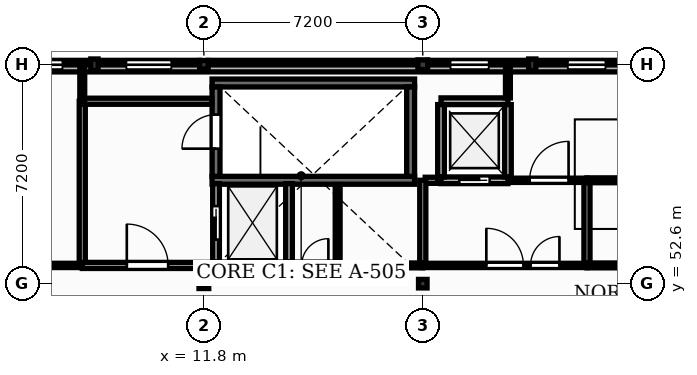
"""IFC4 building model, lengths in metres.
Left out: names, types, materials, properties, quantities, classifications, styles, units other than length and angle.
Written with IfcOpenShell. Run it as: python <this file> out.ifc"""

import sys

from ifc_helpers import new_model, si_unit, direction, frame, frame_2d, origin, origin_2d, place, context, subcontext, project, spatial, polyline, rectangle, outline, extrude, element, fill, save


model = new_model("IFC4")
c1 = context("Model", 3, precision=1e-05, world=origin(), true_north=direction((0.0, 1.0)))
c2 = subcontext(c1, "Body", "Model", "MODEL_VIEW")
j1 = project(units=[si_unit("LENGTHUNIT", "METRE"), si_unit("PLANEANGLEUNIT", "RADIAN")], contexts=[c1])
p1 = place(None, origin())
s1 = spatial("IfcSite", under=j1, at=p1, CompositionType="ELEMENT")
p2 = place(p1, origin())
s2 = spatial("IfcBuilding", under=s1, at=p2, CompositionType="ELEMENT")
p3 = place(p2, frame((0.0, 0.0, 17.4)))
s3 = spatial("IfcBuildingStorey", under=s2, at=p3, CompositionType="ELEMENT", Elevation=17.4)
p4 = place(p3, frame((11.8, 52.6, 0.0), z_axis=(0.0, 0.0, 1.0), x_axis=(1.0, 0.0, 0.0)))
e1 = element("IfcColumn", 1, at=p4, inside=s3, PredefinedType="COLUMN", context=c2, shape_type="SweptSolid", body=[
    extrude(rectangle(XDim=0.32, YDim=0.32, at=origin_2d()), origin(), (0.0, 0.0, 1.0), 3.95),
])
for number, where, z_axis, x_axis in (
    (2, (11.8, 59.8, 0.0), (0.0, 0.0, 1.0), (1.0, 0.0, 0.0)),
    (3, (19.0, 52.6, 0.0), (0.0, 0.0, 1.0), (1.0, 0.0, 0.0)),
):
    element("IfcColumn", number, at=place(p3, frame(where, z_axis=z_axis, x_axis=x_axis)), inside=s3, PredefinedType="COLUMN", context=c2, shape_type="SweptSolid", body=[
        extrude(rectangle(XDim=0.28, YDim=0.28, at=origin_2d()), origin(), (0.0, 0.0, 1.0), 3.95),
    ])
p5 = place(p3, frame((19.0, 59.8, 0.0), z_axis=(0.0, 0.0, 1.0), x_axis=(1.0, 0.0, 0.0)))
e4 = element("IfcColumn", 4, at=p5, inside=s3, PredefinedType="COLUMN", context=c2, shape_type="SweptSolid", body=[
    extrude(rectangle(XDim=0.32, YDim=0.32, at=origin_2d()), origin(), (0.0, 0.0, 1.0), 3.95),
])
for number, where, z_axis, x_axis in (
    (5, (8.2, 59.8, 0.0), (0.0, 0.0, 1.0), (1.0, 0.0, 0.0)),
    (6, (22.6, 59.8, 0.0), (0.0, 0.0, 1.0), (1.0, 0.0, 0.0)),
):
    element("IfcColumn", number, at=place(p3, frame(where, z_axis=z_axis, x_axis=x_axis)), inside=s3, PredefinedType="PILASTER", context=c2, shape_type="SweptSolid", body=[
        extrude(rectangle(XDim=0.24, YDim=0.38, at=origin_2d()), origin(), (0.0, 0.0, 1.0), 3.95),
    ])
p6 = place(p3, frame((4.76, 59.8, 0.0), z_axis=(0.0, 0.0, 1.0), x_axis=(1.0, 0.0, 0.0)))
e7 = element("IfcWall", 7, at=p6, inside=s3, PredefinedType="SOLIDWALL", context=c2, shape_type="SweptSolid", body=[
    extrude(rectangle(XDim=3.32, YDim=0.29, at=frame_2d((1.66, 0.0))), origin(), (0.0, 0.0, 1.0), 3.49),
])
p7 = place(p6, frame((0.77, 0.0, 1.0)))
e8 = element("IfcOpeningElement", 8, at=p7, cuts=e7, PredefinedType="OPENING", context=c2, shape_type="SweptSolid", body=[
    extrude(rectangle(XDim=1.62, YDim=1.95, at=frame_2d((0.81, 0.975))), frame((0.0, 0.155, 0.0), z_axis=(0.0, -1.0, 0.0), x_axis=(1.0, 0.0, 0.0)), (0.0, 0.0, 1.0), 0.31),
])
p8 = place(p3, frame((8.32, 59.8, 0.0), z_axis=(0.0, 0.0, 1.0), x_axis=(1.0, 0.0, 0.0)))
e9 = element("IfcWall", 9, at=p8, inside=s3, PredefinedType="SOLIDWALL", context=c2, shape_type="SweptSolid", body=[
    extrude(rectangle(XDim=3.34, YDim=0.29, at=frame_2d((1.67, 0.0))), origin(), (0.0, 0.0, 1.0), 3.49),
])
p9 = place(p8, frame((0.93, 0.0, 1.0)))
e10 = element("IfcOpeningElement", 10, at=p9, cuts=e9, PredefinedType="OPENING", context=c2, shape_type="SweptSolid", body=[
    extrude(rectangle(XDim=1.48, YDim=1.95, at=frame_2d((0.74, 0.975))), frame((0.0, 0.155, 0.0), z_axis=(0.0, -1.0, 0.0), x_axis=(1.0, 0.0, 0.0)), (0.0, 0.0, 1.0), 0.31),
])
p10 = place(p3, frame((11.94, 59.8, 0.0), z_axis=(0.0, 0.0, 1.0), x_axis=(1.0, 0.0, 0.0)))
e11 = element("IfcWall", 11, at=p10, inside=s3, PredefinedType="SOLIDWALL", context=c2, shape_type="SweptSolid", body=[
    extrude(rectangle(XDim=6.9, YDim=0.29, at=frame_2d((3.45, 0.0))), origin(), (0.0, 0.0, 1.0), 3.49),
])
p11 = place(p3, frame((19.16, 59.8, 0.0), z_axis=(0.0, 0.0, 1.0), x_axis=(1.0, 0.0, 0.0)))
e12 = element("IfcWall", 12, at=p11, inside=s3, PredefinedType="SOLIDWALL", context=c2, shape_type="SweptSolid", body=[
    extrude(rectangle(XDim=3.32, YDim=0.29, at=frame_2d((1.66, 0.0))), origin(), (0.0, 0.0, 1.0), 3.49),
])
p12 = place(p11, frame((0.75, 0.0, 1.05)))
e13 = element("IfcOpeningElement", 13, at=p12, cuts=e12, PredefinedType="OPENING", context=c2, shape_type="SweptSolid", body=[
    extrude(rectangle(XDim=1.26, YDim=1.65, at=frame_2d((0.63, 0.825))), frame((0.0, 0.155, 0.0), z_axis=(0.0, -1.0, 0.0), x_axis=(1.0, 0.0, 0.0)), (0.0, 0.0, 1.0), 0.31),
])
p13 = place(p3, frame((22.72, 59.8, 0.0), z_axis=(0.0, 0.0, 1.0), x_axis=(1.0, 0.0, 0.0)))
e14 = element("IfcWall", 14, at=p13, inside=s3, PredefinedType="SOLIDWALL", context=c2, shape_type="SweptSolid", body=[
    extrude(rectangle(XDim=3.34, YDim=0.29, at=frame_2d((1.67, 0.0))), origin(), (0.0, 0.0, 1.0), 3.49),
])
p14 = place(p13, frame((1.05, 0.0, 1.0)))
e15 = element("IfcOpeningElement", 15, at=p14, cuts=e14, PredefinedType="OPENING", context=c2, shape_type="SweptSolid", body=[
    extrude(rectangle(XDim=1.24, YDim=1.8, at=frame_2d((0.62, 0.9))), frame((0.0, 0.155, 0.0), z_axis=(0.0, -1.0, 0.0), x_axis=(1.0, 0.0, 0.0)), (0.0, 0.0, 1.0), 0.31),
])
p15 = place(p3, frame((4.6, 59.68, 4.2), z_axis=(0.0, 0.0, 1.0), x_axis=(1.0, 0.0, 0.0)))
e16 = element("IfcWall", 16, at=p15, inside=s3, PredefinedType="PARAPET", context=c2, shape_type="SweptSolid", body=[
    extrude(outline(polyline([(0.0, 0.0), (50.4, 0.0), (50.4, 0.65), (39.312, 0.925), (39.312, 0.65), (32.256, 1.2), (32.256, 0.925), (18.144, 1.2), (18.144, 0.925), (11.088, 0.925), (11.088, 0.65), (0.0, 0.65), (0.0, 0.0)])), frame((0.0, 0.115, 0.0), z_axis=(0.0, -1.0, 0.0), x_axis=(1.0, 0.0, 0.0)), (0.0, 0.0, 1.0), 0.23),
])
for number, where, z_axis, x_axis in (
    (17, (12.07, 56.0, 0.0), (0.0, 0.0, 1.0), (1.0, 0.0, 0.0)),
    (18, (12.07, 59.2, 0.0), (0.0, 0.0, 1.0), (1.0, 0.0, 0.0)),
):
    element("IfcWall", number, at=place(p3, frame(where, z_axis=z_axis, x_axis=x_axis)), inside=s3, PredefinedType="SHEAR", context=c2, shape_type="SweptSolid", body=[
        extrude(rectangle(XDim=6.66, YDim=0.26, at=frame_2d((3.33, 0.0))), origin(), (0.0, 0.0, 1.0), 3.95),
    ])
p16 = place(p3, frame((12.2, 56.13, 0.0), z_axis=(0.0, 0.0, 1.0), x_axis=(0.0, 1.0, 0.0)))
e19 = element("IfcWall", 19, at=p16, inside=s3, PredefinedType="SHEAR", context=c2, shape_type="SweptSolid", body=[
    extrude(rectangle(XDim=2.94, YDim=0.26, at=frame_2d((1.47, 0.0))), origin(), (0.0, 0.0, 1.0), 3.95),
])
p17 = place(p16, frame((0.91, 0.0, 0.0)))
e20 = element("IfcOpeningElement", 20, at=p17, cuts=e19, PredefinedType="OPENING", context=c2, shape_type="SweptSolid", body=[
    extrude(rectangle(XDim=1.12, YDim=2.1, at=frame_2d((0.56, 1.05))), frame((0.0, 0.14, 0.0), z_axis=(0.0, -1.0, 0.0), x_axis=(1.0, 0.0, 0.0)), (0.0, 0.0, 1.0), 0.28),
])
p18 = place(p3, frame((18.6, 56.13, 0.0), z_axis=(0.0, 0.0, 1.0), x_axis=(0.0, 1.0, 0.0)))
e21 = element("IfcWall", 21, at=p18, inside=s3, PredefinedType="SHEAR", context=c2, shape_type="SweptSolid", body=[
    extrude(rectangle(XDim=2.94, YDim=0.26, at=frame_2d((1.47, 0.0))), origin(), (0.0, 0.0, 1.0), 3.95),
])
p19 = place(p3, frame((12.2, 53.2, 0.0), z_axis=(0.0, 0.0, 1.0), x_axis=(1.0, 0.0, 0.0)))
e22 = element("IfcWall", 22, at=p19, inside=s3, PredefinedType="SOLIDWALL", context=c2, shape_type="SweptSolid", body=[
    extrude(rectangle(XDim=2.4, YDim=0.22, at=frame_2d((1.2, 0.0))), origin(), (0.0, 0.0, 1.0), 3.95),
])
p20 = place(p3, frame((12.2, 53.31, 0.0), z_axis=(0.0, 0.0, 1.0), x_axis=(0.0, 1.0, 0.0)))
e23 = element("IfcWall", 23, at=p20, inside=s3, PredefinedType="SOLIDWALL", context=c2, shape_type="SweptSolid", body=[
    extrude(rectangle(XDim=2.58, YDim=0.22, at=frame_2d((1.29, 0.0))), origin(), (0.0, 0.0, 1.0), 3.95),
])
p21 = place(p20, frame((0.74, 0.0, 0.0)))
e24 = element("IfcOpeningElement", 24, at=p21, cuts=e23, PredefinedType="OPENING", context=c2, shape_type="SweptSolid", body=[
    extrude(rectangle(XDim=1.1, YDim=2.15, at=frame_2d((0.55, 1.075))), frame((0.0, 0.12, 0.0), z_axis=(0.0, -1.0, 0.0), x_axis=(1.0, 0.0, 0.0)), (0.0, 0.0, 1.0), 0.24),
])
p22 = place(p3, frame((14.6, 53.31, 0.0), z_axis=(0.0, 0.0, 1.0), x_axis=(0.0, 1.0, 0.0)))
e25 = element("IfcWall", 25, at=p22, inside=s3, PredefinedType="SOLIDWALL", context=c2, shape_type="SweptSolid", body=[
    extrude(rectangle(XDim=2.58, YDim=0.22, at=frame_2d((1.29, 0.0))), origin(), (0.0, 0.0, 1.0), 3.95),
])
p23 = place(p3, frame((19.6, 56.0, 0.0), z_axis=(0.0, 0.0, 1.0), x_axis=(1.0, 0.0, 0.0)))
e26 = element("IfcWall", 26, at=p23, inside=s3, PredefinedType="SOLIDWALL", context=c2, shape_type="SweptSolid", body=[
    extrude(rectangle(XDim=2.2, YDim=0.22, at=frame_2d((1.1, 0.0))), origin(), (0.0, 0.0, 1.0), 3.95),
])
p24 = place(p23, frame((0.6, 0.0, 0.0)))
e27 = element("IfcOpeningElement", 27, at=p24, cuts=e26, PredefinedType="OPENING", context=c2, shape_type="SweptSolid", body=[
    extrude(rectangle(XDim=1.0, YDim=2.15, at=frame_2d((0.5, 1.075))), frame((0.0, 0.12, 0.0), z_axis=(0.0, -1.0, 0.0), x_axis=(1.0, 0.0, 0.0)), (0.0, 0.0, 1.0), 0.24),
])
p25 = place(p3, frame((19.6, 58.6, 0.0), z_axis=(0.0, 0.0, 1.0), x_axis=(1.0, 0.0, 0.0)))
e28 = element("IfcWall", 28, at=p25, inside=s3, PredefinedType="SOLIDWALL", context=c2, shape_type="SweptSolid", body=[
    extrude(rectangle(XDim=2.2, YDim=0.22, at=frame_2d((1.1, 0.0))), origin(), (0.0, 0.0, 1.0), 3.95),
])
for number, where, z_axis, x_axis in (
    (29, (19.6, 56.11, 0.0), (0.0, 0.0, 1.0), (0.0, 1.0, 0.0)),
    (30, (21.8, 56.11, 0.0), (0.0, 0.0, 1.0), (0.0, 1.0, 0.0)),
):
    element("IfcWall", number, at=place(p3, frame(where, z_axis=z_axis, x_axis=x_axis)), inside=s3, PredefinedType="SOLIDWALL", context=c2, shape_type="SweptSolid", body=[
        extrude(rectangle(XDim=2.38, YDim=0.22, at=frame_2d((1.19, 0.0))), origin(), (0.0, 0.0, 1.0), 3.95),
    ])
p26 = place(p3, frame((4.6, 53.2, 0.0), z_axis=(0.0, 0.0, 1.0), x_axis=(1.0, 0.0, 0.0)))
e31 = element("IfcWall", 31, at=p26, inside=s3, PredefinedType="PARTITIONING", context=c2, shape_type="SweptSolid", body=[
    extrude(rectangle(XDim=3.2, YDim=0.14, at=frame_2d((1.6, 0.0))), origin(), (0.0, 0.0, 1.0), 3.93),
])
p27 = place(p26, frame((1.15, 0.0, 0.0)))
e32 = element("IfcOpeningElement", 32, at=p27, cuts=e31, PredefinedType="OPENING", context=c2, shape_type="SweptSolid", body=[
    extrude(rectangle(XDim=0.9, YDim=2.1, at=frame_2d((0.45, 1.05))), frame((0.0, 0.08, 0.0), z_axis=(0.0, -1.0, 0.0), x_axis=(1.0, 0.0, 0.0)), (0.0, 0.0, 1.0), 0.16),
])
p28 = place(p3, frame((7.8, 53.27, 0.0), z_axis=(0.0, 0.0, 1.0), x_axis=(0.0, 1.0, 0.0)))
e33 = element("IfcWall", 33, at=p28, inside=s3, PredefinedType="PARTITIONING", context=c2, shape_type="SweptSolid", body=[
    extrude(rectangle(XDim=5.33, YDim=0.2, at=frame_2d((2.665, 0.0))), origin(), (0.0, 0.0, 1.0), 3.93),
])
p29 = place(p3, frame((7.8, 53.2, 0.0), z_axis=(0.0, 0.0, 1.0), x_axis=(1.0, 0.0, 0.0)))
e34 = element("IfcWall", 34, at=p29, inside=s3, PredefinedType="PARTITIONING", context=c2, shape_type="SweptSolid", body=[
    extrude(rectangle(XDim=4.29, YDim=0.2, at=frame_2d((2.145, 0.0))), origin(), (0.0, 0.0, 1.0), 3.93),
])
p30 = place(p29, frame((1.465, 0.0, 0.0)))
e35 = element("IfcOpeningElement", 35, at=p30, cuts=e34, PredefinedType="OPENING", context=c2, shape_type="SweptSolid", body=[
    extrude(rectangle(XDim=1.36, YDim=2.2, at=frame_2d((0.68, 1.1))), frame((0.0, 0.11, 0.0), z_axis=(0.0, -1.0, 0.0), x_axis=(1.0, 0.0, 0.0)), (0.0, 0.0, 1.0), 0.22),
])
p31 = place(p3, frame((14.71, 53.2, 0.0), z_axis=(0.0, 0.0, 1.0), x_axis=(1.0, 0.0, 0.0)))
e36 = element("IfcWall", 36, at=p31, inside=s3, PredefinedType="SOLIDWALL", context=c2, shape_type="SweptSolid", body=[
    extrude(rectangle(XDim=1.49, YDim=0.22, at=frame_2d((0.745, 0.0))), origin(), (0.0, 0.0, 1.0), 3.93),
])
p32 = place(p31, frame((0.305, 0.0, 0.0)))
e37 = element("IfcOpeningElement", 37, at=p32, cuts=e36, PredefinedType="OPENING", context=c2, shape_type="SweptSolid", body=[
    extrude(rectangle(XDim=0.88, YDim=2.05, at=frame_2d((0.44, 1.025))), frame((0.0, 0.12, 0.0), z_axis=(0.0, -1.0, 0.0), x_axis=(1.0, 0.0, 0.0)), (0.0, 0.0, 1.0), 0.24),
])
p33 = place(p3, frame((19.0, 53.2, 0.0), z_axis=(0.0, 0.0, 1.0), x_axis=(1.0, 0.0, 0.0)))
e38 = element("IfcWall", 38, at=p33, inside=s3, PredefinedType="PARTITIONING", context=c2, shape_type="SweptSolid", body=[
    extrude(rectangle(XDim=5.4, YDim=0.14, at=frame_2d((2.7, 0.0))), origin(), (0.0, 0.0, 1.0), 3.93),
])
p34 = place(p33, frame((2.09, 0.0, 0.0)))
e39 = element("IfcOpeningElement", 39, at=p34, cuts=e38, PredefinedType="OPENING", context=c2, shape_type="SweptSolid", body=[
    extrude(rectangle(XDim=1.22, YDim=2.1, at=frame_2d((0.61, 1.05))), frame((0.0, 0.08, 0.0), z_axis=(0.0, -1.0, 0.0), x_axis=(1.0, 0.0, 0.0)), (0.0, 0.0, 1.0), 0.16),
])
p35 = place(p33, frame((3.545, 0.0, 0.0)))
e40 = element("IfcOpeningElement", 40, at=p35, cuts=e38, PredefinedType="OPENING", context=c2, shape_type="SweptSolid", body=[
    extrude(rectangle(XDim=0.95, YDim=2.1, at=frame_2d((0.475, 1.05))), frame((0.0, 0.08, 0.0), z_axis=(0.0, -1.0, 0.0), x_axis=(1.0, 0.0, 0.0)), (0.0, 0.0, 1.0), 0.16),
])
p36 = place(p3, frame((21.91, 56.0, 0.0), z_axis=(0.0, 0.0, 1.0), x_axis=(1.0, 0.0, 0.0)))
e41 = element("IfcWall", 41, at=p36, inside=s3, PredefinedType="PARTITIONING", context=c2, shape_type="SweptSolid", body=[
    extrude(rectangle(XDim=2.49, YDim=0.14, at=frame_2d((1.245, 0.0))), origin(), (0.0, 0.0, 1.0), 3.93),
])
p37 = place(p36, frame((0.605, 0.0, 0.0)))
e42 = element("IfcOpeningElement", 42, at=p37, cuts=e41, PredefinedType="OPENING", context=c2, shape_type="SweptSolid", body=[
    extrude(rectangle(XDim=1.28, YDim=2.2, at=frame_2d((0.64, 1.1))), frame((0.0, 0.08, 0.0), z_axis=(0.0, -1.0, 0.0), x_axis=(1.0, 0.0, 0.0)), (0.0, 0.0, 1.0), 0.16),
])
p38 = place(p3, frame((16.2, 53.27, 0.0), z_axis=(0.0, 0.0, 1.0), x_axis=(0.0, 1.0, 0.0)))
e43 = element("IfcWall", 43, at=p38, inside=s3, PredefinedType="PARTITIONING", context=c2, shape_type="SweptSolid", body=[
    extrude(rectangle(XDim=2.59, YDim=0.16, at=frame_2d((1.295, 0.0))), origin(), (0.0, 0.0, 1.0), 3.93),
])
p39 = place(p3, frame((12.06, 58.6, 0.0), z_axis=(0.0, 0.0, 1.0), x_axis=(-1.0, 0.0, 0.0)))
e44 = element("IfcWall", 44, at=p39, inside=s3, PredefinedType="PARTITIONING", context=c2, shape_type="SweptSolid", body=[
    extrude(rectangle(XDim=4.26, YDim=0.2, at=frame_2d((2.13, 0.0))), origin(), (0.0, 0.0, 1.0), 3.93),
])
p40 = place(p3, frame((24.4, 53.27, 0.0), z_axis=(0.0, 0.0, 1.0), x_axis=(0.0, 1.0, 0.0)))
e45 = element("IfcWall", 45, at=p40, inside=s3, PredefinedType="PARTITIONING", context=c2, shape_type="SweptSolid", body=[
    extrude(rectangle(XDim=2.66, YDim=0.2, at=frame_2d((1.33, 0.0))), origin(), (0.0, 0.0, 1.0), 3.93),
])
p41 = place(p3, frame((19.49, 56.0, 0.0), z_axis=(0.0, 0.0, 1.0), x_axis=(-1.0, 0.0, 0.0)))
e46 = element("IfcWall", 46, at=p41, inside=s3, PredefinedType="PARTITIONING", context=c2, shape_type="SweptSolid", body=[
    extrude(rectangle(XDim=0.41, YDim=0.2, at=frame_2d((0.205, 0.0))), origin(), (0.0, 0.0, 1.0), 3.93),
])
p42 = place(p3, frame((19.0, 53.27, 0.0), z_axis=(0.0, 0.0, 1.0), x_axis=(0.0, 1.0, 0.0)))
e47 = element("IfcWall", 47, at=p42, inside=s3, PredefinedType="PARTITIONING", context=c2, shape_type="SweptSolid", body=[
    extrude(rectangle(XDim=2.73, YDim=0.2, at=frame_2d((1.365, 0.0))), origin(), (0.0, 0.0, 1.0), 3.49),
])
p43 = place(p3, frame((26.2, 53.2, 0.0), z_axis=(0.0, 0.0, 1.0), x_axis=(-1.0, 0.0, 0.0)))
e48 = element("IfcWall", 48, at=p43, inside=s3, PredefinedType="PARTITIONING", context=c2, shape_type="SweptSolid", body=[
    extrude(rectangle(XDim=1.8, YDim=0.16, at=frame_2d((0.9, 0.0))), origin(), (0.0, 0.0, 1.0), 3.93),
])
p44 = place(p3, frame((19.0, 53.2, 0.0), z_axis=(0.0, 0.0, 1.0), x_axis=(-1.0, 0.0, 0.0)))
e49 = element("IfcWall", 49, at=p44, inside=s3, PredefinedType="PARTITIONING", context=c2, shape_type="SweptSolid", body=[
    extrude(rectangle(XDim=2.8, YDim=0.16, at=frame_2d((1.4, 0.0))), origin(), (0.0, 0.0, 1.0), 3.93),
])
p45 = place(p3, frame((7.8, 58.6, 0.0), z_axis=(0.0, 0.0, 1.0), x_axis=(0.0, 1.0, 0.0)))
e50 = element("IfcWall", 50, at=p45, inside=s3, PredefinedType="PARTITIONING", context=c2, shape_type="SweptSolid", body=[
    extrude(rectangle(XDim=1.2, YDim=0.16, at=frame_2d((0.6, 0.0))), origin(), (0.0, 0.0, 1.0), 3.93),
])
p46 = place(p3, frame((24.4, 56.0, 0.0), z_axis=(0.0, 0.0, 1.0), x_axis=(1.0, 0.0, 0.0)))
e51 = element("IfcWall", 51, at=p46, inside=s3, PredefinedType="PARTITIONING", context=c2, shape_type="SweptSolid", body=[
    extrude(rectangle(XDim=1.8, YDim=0.16, at=frame_2d((0.9, 0.0))), origin(), (0.0, 0.0, 1.0), 3.93),
])
p47 = place(p3, frame((21.8, 58.71, 0.0), z_axis=(0.0, 0.0, 1.0), x_axis=(0.0, 1.0, 0.0)))
e52 = element("IfcWall", 52, at=p47, inside=s3, PredefinedType="PARTITIONING", context=c2, shape_type="SweptSolid", body=[
    extrude(rectangle(XDim=1.09, YDim=0.16, at=frame_2d((0.545, 0.0))), origin(), (0.0, 0.0, 1.0), 3.93),
])
p48 = place(p7, origin())
e53 = element("IfcWindow", 53, at=p48, inside=s3, PartitioningType="DOUBLE_PANEL_VERTICAL", PredefinedType="WINDOW", context=c2, shape_type="SweptSolid", body=[
    extrude(rectangle(XDim=1.62, YDim=1.95, at=frame_2d((0.81, 0.975))), frame((0.0, 0.03, 0.0), z_axis=(0.0, -1.0, 0.0), x_axis=(1.0, 0.0, 0.0)), (0.0, 0.0, 1.0), 0.06),
])
fill(e8, e53)
p49 = place(p9, origin())
e54 = element("IfcWindow", 54, at=p49, inside=s3, PartitioningType="SINGLE_PANEL", PredefinedType="WINDOW", context=c2, shape_type="SweptSolid", body=[
    extrude(rectangle(XDim=1.48, YDim=1.95, at=frame_2d((0.74, 0.975))), frame((0.0, 0.03, 0.0), z_axis=(0.0, -1.0, 0.0), x_axis=(1.0, 0.0, 0.0)), (0.0, 0.0, 1.0), 0.06),
])
fill(e10, e54)
p50 = place(p12, origin())
e55 = element("IfcWindow", 55, at=p50, inside=s3, PartitioningType="SINGLE_PANEL", PredefinedType="WINDOW", context=c2, shape_type="SweptSolid", body=[
    extrude(rectangle(XDim=1.26, YDim=1.65, at=frame_2d((0.63, 0.825))), frame((0.0, 0.03, 0.0), z_axis=(0.0, -1.0, 0.0), x_axis=(1.0, 0.0, 0.0)), (0.0, 0.0, 1.0), 0.06),
])
fill(e13, e55)
p51 = place(p14, origin())
e56 = element("IfcWindow", 56, at=p51, inside=s3, PartitioningType="SINGLE_PANEL", PredefinedType="WINDOW", context=c2, shape_type="SweptSolid", body=[
    extrude(rectangle(XDim=1.24, YDim=1.8, at=frame_2d((0.62, 0.9))), frame((0.0, 0.03, 0.0), z_axis=(0.0, -1.0, 0.0), x_axis=(1.0, 0.0, 0.0)), (0.0, 0.0, 1.0), 0.06),
])
fill(e15, e56)
p52 = place(p21, origin())
e57 = element("IfcDoor", 57, at=p52, inside=s3, OperationType="SLIDING_TO_LEFT", PredefinedType="DOOR", context=c2, shape_type="SweptSolid", body=[
    extrude(rectangle(XDim=1.1, YDim=2.15, at=frame_2d((0.55, 1.075))), frame((0.0, 0.025, 0.0), z_axis=(0.0, -1.0, 0.0), x_axis=(1.0, 0.0, 0.0)), (0.0, 0.0, 1.0), 0.05),
])
fill(e24, e57)
p53 = place(p24, origin())
e58 = element("IfcDoor", 58, at=p53, inside=s3, OperationType="SLIDING_TO_LEFT", PredefinedType="DOOR", context=c2, shape_type="SweptSolid", body=[
    extrude(rectangle(XDim=1.0, YDim=2.15, at=frame_2d((0.5, 1.075))), frame((0.0, 0.025, 0.0), z_axis=(0.0, -1.0, 0.0), x_axis=(1.0, 0.0, 0.0)), (0.0, 0.0, 1.0), 0.05),
])
fill(e27, e58)
p54 = place(p17, origin())
e59 = element("IfcDoor", 59, at=p54, inside=s3, OperationType="SINGLE_SWING_LEFT", PredefinedType="DOOR", context=c2, shape_type="SweptSolid", body=[
    extrude(rectangle(XDim=1.12, YDim=2.1, at=frame_2d((0.56, 1.05))), frame((0.0, 0.025, 0.0), z_axis=(0.0, -1.0, 0.0), x_axis=(1.0, 0.0, 0.0)), (0.0, 0.0, 1.0), 0.05),
])
fill(e20, e59)
p55 = place(p30, origin())
e60 = element("IfcDoor", 60, at=p55, inside=s3, OperationType="SINGLE_SWING_LEFT", PredefinedType="DOOR", context=c2, shape_type="SweptSolid", body=[
    extrude(rectangle(XDim=1.36, YDim=2.2, at=frame_2d((0.68, 1.1))), frame((0.0, 0.025, 0.0), z_axis=(0.0, -1.0, 0.0), x_axis=(1.0, 0.0, 0.0)), (0.0, 0.0, 1.0), 0.05),
])
fill(e35, e60)
p56 = place(p34, origin())
e61 = element("IfcDoor", 61, at=p56, inside=s3, OperationType="SINGLE_SWING_LEFT", PredefinedType="DOOR", context=c2, shape_type="SweptSolid", body=[
    extrude(rectangle(XDim=1.22, YDim=2.1, at=frame_2d((0.61, 1.05))), frame((0.0, 0.025, 0.0), z_axis=(0.0, -1.0, 0.0), x_axis=(1.0, 0.0, 0.0)), (0.0, 0.0, 1.0), 0.05),
])
fill(e39, e61)
p57 = place(p35, origin())
e62 = element("IfcDoor", 62, at=p57, inside=s3, OperationType="SINGLE_SWING_RIGHT", PredefinedType="DOOR", context=c2, shape_type="SweptSolid", body=[
    extrude(rectangle(XDim=0.95, YDim=2.1, at=frame_2d((0.475, 1.05))), frame((0.0, 0.025, 0.0), z_axis=(0.0, -1.0, 0.0), x_axis=(1.0, 0.0, 0.0)), (0.0, 0.0, 1.0), 0.05),
])
fill(e40, e62)
p58 = place(p32, origin())
e63 = element("IfcDoor", 63, at=p58, inside=s3, OperationType="SINGLE_SWING_RIGHT", PredefinedType="DOOR", context=c2, shape_type="SweptSolid", body=[
    extrude(rectangle(XDim=0.88, YDim=2.05, at=frame_2d((0.44, 1.025))), frame((0.0, 0.025, 0.0), z_axis=(0.0, -1.0, 0.0), x_axis=(1.0, 0.0, 0.0)), (0.0, 0.0, 1.0), 0.05),
])
fill(e37, e63)
p59 = place(p37, origin())
e64 = element("IfcDoor", 64, at=p59, inside=s3, OperationType="SINGLE_SWING_RIGHT", PredefinedType="DOOR", context=c2, shape_type="SweptSolid", body=[
    extrude(rectangle(XDim=1.28, YDim=2.2, at=frame_2d((0.64, 1.1))), frame((0.0, 0.025, 0.0), z_axis=(0.0, -1.0, 0.0), x_axis=(1.0, 0.0, 0.0)), (0.0, 0.0, 1.0), 0.05),
])
fill(e42, e64)
save(model, sys.argv[1])
